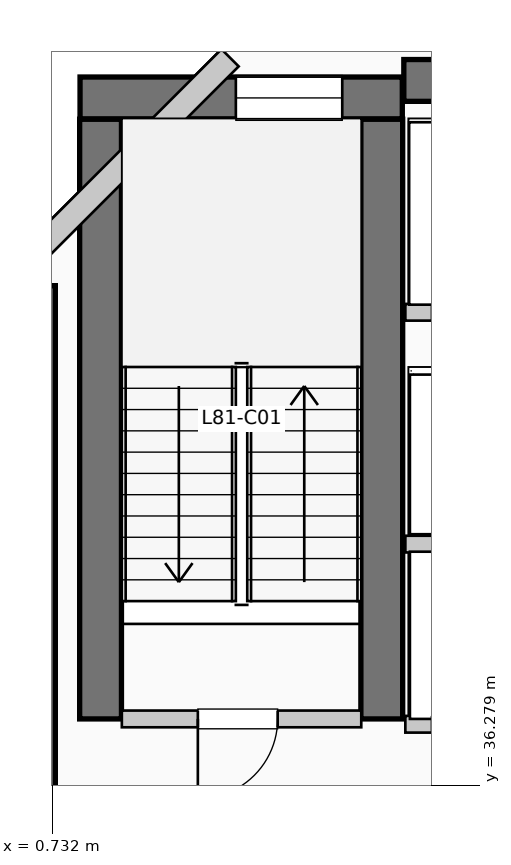
"""IFC4 building model, lengths in metres.
Left out: names, types, materials, properties, quantities, classifications, styles, units other than length and angle.
Written with IfcOpenShell. Run it as: python <this file> out.ifc"""

import sys

from ifc_helpers import new_model, si_unit, direction, frame, frame_2d, origin, place, context, subcontext, project, spatial, rectangle, extrude, element, fill, save


model = new_model("IFC4")
c1 = context("Model", 3, precision=1e-05, world=origin(), true_north=direction((0.0, 1.0)))
c2 = subcontext(c1, "Body", "Model", "MODEL_VIEW")
j1 = project(units=[si_unit("LENGTHUNIT", "METRE"), si_unit("PLANEANGLEUNIT", "RADIAN")], contexts=[c1])
p1 = place(None, origin())
s1 = spatial("IfcSite", under=j1, at=p1, CompositionType="ELEMENT")
p2 = place(p1, origin())
s2 = spatial("IfcBuilding", under=s1, at=p2, CompositionType="ELEMENT")
p3 = place(p2, frame((0.0, 0.0, 331.65)))
s3 = spatial("IfcBuildingStorey", under=s2, at=p3, CompositionType="ELEMENT", Elevation=331.65)
p4 = place(p3, frame((5.36, 45.55, 0.0), z_axis=(0.0, 0.0, 1.0), x_axis=(1.0, 0.0, 0.0)))
e1 = element("IfcWall", 1, at=p4, inside=s3, PredefinedType="SHEAR", context=c2, shape_type="SweptSolid", body=[
    extrude(rectangle(XDim=13.98, YDim=0.55, at=frame_2d((6.99, 0.0))), origin(), (0.0, 0.0, 1.0), 3.96),
])
p5 = place(p3, frame((0.5, 34.95, 0.0), z_axis=(0.0, 0.0, 1.0), x_axis=(0.0, 1.0, 0.0)))
e2 = element("IfcWall", 2, at=p5, inside=s3, PredefinedType="SHEAR", context=c2, shape_type="SweptSolid", body=[
    extrude(rectangle(XDim=7.9, YDim=0.55, at=frame_2d((3.95, 0.0))), origin(), (0.0, 0.0, 1.0), 3.96),
])
for number, where, z_axis, x_axis in (
    (3, (1.37, 37.15, 0.0), (0.0, 0.0, 1.0), (0.0, 1.0, 0.0)),
    (4, (5.07, 37.15, 0.0), (0.0, 0.0, 1.0), (0.0, 1.0, 0.0)),
):
    element("IfcWall", number, at=place(p3, frame(where, z_axis=z_axis, x_axis=x_axis)), inside=s3, PredefinedType="SHEAR", context=c2, shape_type="SweptSolid", body=[
        extrude(rectangle(XDim=7.89, YDim=0.55, at=frame_2d((3.945, 0.0))), origin(), (0.0, 0.0, 1.0), 3.96),
    ])
p6 = place(p3, frame((1.1, 45.32, 0.0), z_axis=(0.0, 0.0, 1.0), x_axis=(1.0, 0.0, 0.0)))
e5 = element("IfcWall", 5, at=p6, inside=s3, PredefinedType="SHEAR", context=c2, shape_type="SweptSolid", body=[
    extrude(rectangle(XDim=4.24, YDim=0.55, at=frame_2d((2.12, 0.0))), origin(), (0.0, 0.0, 1.0), 3.96),
])
p7 = place(p6, frame((2.05, 0.0, 1.05)))
e6 = element("IfcOpeningElement", 6, at=p7, cuts=e5, PredefinedType="OPENING", context=c2, shape_type="SweptSolid", body=[
    extrude(rectangle(XDim=1.4, YDim=1.8, at=frame_2d((0.7, 0.9))), frame((0.0, 0.285, 0.0), z_axis=(0.0, -1.0, 0.0), x_axis=(1.0, 0.0, 0.0)), (0.0, 0.0, 1.0), 0.57),
])
p8 = place(p3, frame((3.074, 45.848, 0.0), z_axis=(0.0, 0.0, 1.0), x_axis=(-0.707106781187, -0.707106781187, 0.0)))
e7 = element("IfcWall", 7, at=p8, inside=s3, PredefinedType="SOLIDWALL", context=c2, shape_type="SweptSolid", body=[
    extrude(rectangle(XDim=4.133, YDim=0.32, at=frame_2d((2.066, 0.0))), origin(), (0.0, 0.0, 1.0), 3.74),
])
p9 = place(p3, frame((1.65, 37.15, 0.0), z_axis=(0.0, 0.0, 1.0), x_axis=(1.0, 0.0, 0.0)))
e8 = element("IfcWall", 8, at=p9, inside=s3, PredefinedType="PARTITIONING", context=c2, shape_type="SweptSolid", body=[
    extrude(rectangle(XDim=3.15, YDim=0.22, at=frame_2d((1.575, 0.0))), origin(), (0.0, 0.0, 1.0), 3.74),
])
p10 = place(p9, frame((2.05, 0.0, 0.0), z_axis=(0.0, 0.0, 1.0), x_axis=(-1.0, 0.0, 0.0)))
e9 = element("IfcOpeningElement", 9, at=p10, cuts=e8, PredefinedType="OPENING", context=c2, shape_type="SweptSolid", body=[
    extrude(rectangle(XDim=1.05, YDim=2.15, at=frame_2d((0.525, 1.075))), frame((0.0, 0.12, 0.0), z_axis=(0.0, -1.0, 0.0), x_axis=(1.0, 0.0, 0.0)), (0.0, 0.0, 1.0), 0.24),
])
p11 = place(p3, frame((5.38, 37.08, 0.0), z_axis=(0.0, 0.0, 1.0), x_axis=(1.0, 0.0, 0.0)))
e10 = element("IfcWall", 10, at=p11, inside=s3, PredefinedType="PARTITIONING", context=c2, shape_type="SweptSolid", body=[
    extrude(rectangle(XDim=3.46, YDim=0.22, at=frame_2d((1.73, 0.0))), origin(), (0.0, 0.0, 1.0), 3.74),
])
p12 = place(p11, frame((1.55, 0.0, 0.0), z_axis=(0.0, 0.0, 1.0), x_axis=(-1.0, 0.0, 0.0)))
e11 = element("IfcOpeningElement", 11, at=p12, cuts=e10, PredefinedType="OPENING", context=c2, shape_type="SweptSolid", body=[
    extrude(rectangle(XDim=1.2, YDim=2.2, at=frame_2d((0.6, 1.1))), frame((0.0, 0.12, 0.0), z_axis=(0.0, -1.0, 0.0), x_axis=(1.0, 0.0, 0.0)), (0.0, 0.0, 1.0), 0.24),
])
p13 = place(p11, frame((3.22, 0.0, 0.0), z_axis=(0.0, 0.0, 1.0), x_axis=(-1.0, 0.0, 0.0)))
e12 = element("IfcOpeningElement", 12, at=p13, cuts=e10, PredefinedType="OPENING", context=c2, shape_type="SweptSolid", body=[
    extrude(rectangle(XDim=1.2, YDim=2.2, at=frame_2d((0.6, 1.1))), frame((0.0, 0.12, 0.0), z_axis=(0.0, -1.0, 0.0), x_axis=(1.0, 0.0, 0.0)), (0.0, 0.0, 1.0), 0.24),
])
p14 = place(p3, frame((5.38, 39.45, 0.0), z_axis=(0.0, 0.0, 1.0), x_axis=(1.0, 0.0, 0.0)))
e13 = element("IfcWall", 13, at=p14, inside=s3, PredefinedType="PARTITIONING", context=c2, shape_type="SweptSolid", body=[
    extrude(rectangle(XDim=3.46, YDim=0.22, at=frame_2d((1.73, 0.0))), origin(), (0.0, 0.0, 1.0), 3.74),
])
p15 = place(p3, frame((5.38, 42.5, 0.0), z_axis=(0.0, 0.0, 1.0), x_axis=(1.0, 0.0, 0.0)))
e14 = element("IfcWall", 14, at=p15, inside=s3, PredefinedType="PARTITIONING", context=c2, shape_type="SweptSolid", body=[
    extrude(rectangle(XDim=3.77, YDim=0.22, at=frame_2d((1.885, 0.0))), origin(), (0.0, 0.0, 1.0), 3.74),
])
p16 = place(p15, frame((1.75, 0.0, 0.0), z_axis=(0.0, 0.0, 1.0), x_axis=(-1.0, 0.0, 0.0)))
e15 = element("IfcOpeningElement", 15, at=p16, cuts=e14, PredefinedType="OPENING", context=c2, shape_type="SweptSolid", body=[
    extrude(rectangle(XDim=1.4, YDim=2.2, at=frame_2d((0.7, 1.1))), frame((0.0, 0.12, 0.0), z_axis=(0.0, -1.0, 0.0), x_axis=(1.0, 0.0, 0.0)), (0.0, 0.0, 1.0), 0.24),
])
p17 = place(p15, frame((3.53, 0.0, 0.0), z_axis=(0.0, 0.0, 1.0), x_axis=(-1.0, 0.0, 0.0)))
e16 = element("IfcOpeningElement", 16, at=p17, cuts=e14, PredefinedType="OPENING", context=c2, shape_type="SweptSolid", body=[
    extrude(rectangle(XDim=1.4, YDim=2.2, at=frame_2d((0.7, 1.1))), frame((0.0, 0.12, 0.0), z_axis=(0.0, -1.0, 0.0), x_axis=(1.0, 0.0, 0.0)), (0.0, 0.0, 1.0), 0.24),
])
p18 = place(p7, origin())
e17 = element("IfcWindow", 17, at=p18, inside=s3, PartitioningType="SINGLE_PANEL", PredefinedType="WINDOW", context=c2, shape_type="SweptSolid", body=[
    extrude(rectangle(XDim=1.4, YDim=1.8, at=frame_2d((0.7, 0.9))), frame((0.0, 0.03, 0.0), z_axis=(0.0, -1.0, 0.0), x_axis=(1.0, 0.0, 0.0)), (0.0, 0.0, 1.0), 0.06),
])
fill(e6, e17)
p19 = place(p10, origin())
e18 = element("IfcDoor", 18, at=p19, inside=s3, OperationType="SINGLE_SWING_LEFT", PredefinedType="DOOR", context=c2, shape_type="SweptSolid", body=[
    extrude(rectangle(XDim=1.05, YDim=2.15, at=frame_2d((0.525, 1.075))), frame((0.0, 0.025, 0.0), z_axis=(0.0, -1.0, 0.0), x_axis=(1.0, 0.0, 0.0)), (0.0, 0.0, 1.0), 0.05),
])
fill(e9, e18)
save(model, sys.argv[1])
